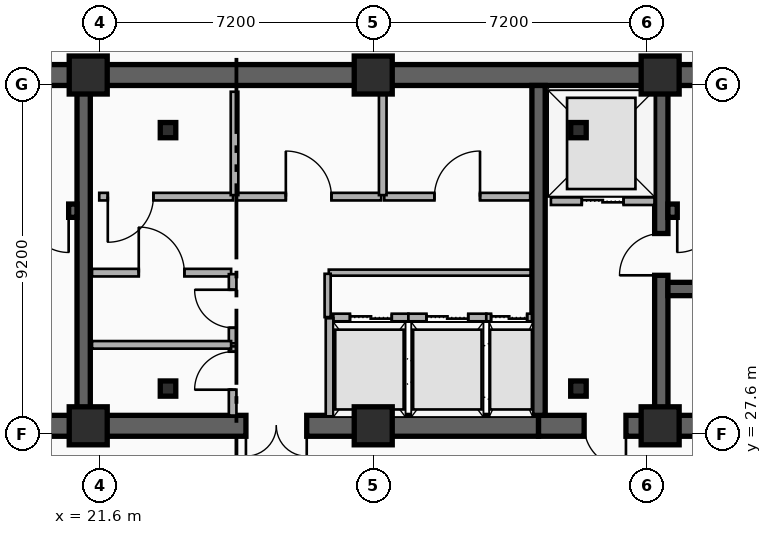
"""IFC4 building model, lengths in metres.
Left out: names, types, materials, properties, quantities, classifications, styles, units other than length and angle.
Written with IfcOpenShell. Run it as: python <this file> out.ifc"""

import sys

from ifc_helpers import new_model, si_unit, direction, frame, frame_2d, origin, origin_2d, place, context, subcontext, project, spatial, rectangle, i_section, extrude, element, fill, save


model = new_model("IFC4")
c1 = context("Model", 3, precision=1e-05, world=origin(), true_north=direction((0.0, 1.0)))
c2 = subcontext(c1, "Body", "Model", "MODEL_VIEW")
j1 = project(units=[si_unit("LENGTHUNIT", "METRE"), si_unit("PLANEANGLEUNIT", "RADIAN")], contexts=[c1])
p1 = place(None, origin())
s1 = spatial("IfcSite", under=j1, at=p1, CompositionType="ELEMENT")
p2 = place(p1, origin())
s2 = spatial("IfcBuilding", under=s1, at=p2, CompositionType="ELEMENT")
p3 = place(p2, frame((0.0, 0.0, 200.4)))
s3 = spatial("IfcBuildingStorey", under=s2, at=p3, CompositionType="ELEMENT", Elevation=200.4)
p4 = place(p3, frame((12.15, 37.05, 0.0), z_axis=(0.0, 0.0, 1.0), x_axis=(1.0, 0.0, 0.0)))
e1 = element("IfcWall", 1, at=p4, inside=s3, PredefinedType="SHEAR", context=c2, shape_type="SweptSolid", body=[
    extrude(rectangle(XDim=33.23, YDim=0.55, at=frame_2d((16.615, 0.0))), origin(), (0.0, 0.0, 1.0), 3.6),
])
p5 = place(p3, frame((21.18, 27.82, 0.0), z_axis=(0.0, 0.0, 1.0), x_axis=(-1.0, 0.0, 0.0)))
e2 = element("IfcWall", 2, at=p5, inside=s3, PredefinedType="SHEAR", context=c2, shape_type="SweptSolid", body=[
    extrude(rectangle(XDim=9.03, YDim=0.55, at=frame_2d((4.515, 0.0))), origin(), (0.0, 0.0, 1.0), 3.6),
])
p6 = place(p5, frame((2.68, 0.0, 0.0)))
e3 = element("IfcOpeningElement", 3, at=p6, cuts=e2, PredefinedType="OPENING", context=c2, shape_type="SweptSolid", body=[
    extrude(rectangle(XDim=1.1, YDim=2.15, at=frame_2d((0.55, 1.075))), frame((0.0, 0.285, 0.0), z_axis=(0.0, -1.0, 0.0), x_axis=(1.0, 0.0, 0.0)), (0.0, 0.0, 1.0), 0.57),
])
p7 = place(p3, frame((33.15, 27.82, 0.0), z_axis=(0.0, 0.0, 1.0), x_axis=(-1.0, 0.0, 0.0)))
e4 = element("IfcWall", 4, at=p7, inside=s3, PredefinedType="SHEAR", context=c2, shape_type="SweptSolid", body=[
    extrude(rectangle(XDim=11.97, YDim=0.55, at=frame_2d((5.985, 0.0))), origin(), (0.0, 0.0, 1.0), 3.6),
])
p8 = place(p7, frame((6.1, 0.0, 0.0)))
e5 = element("IfcOpeningElement", 5, at=p8, cuts=e4, PredefinedType="OPENING", context=c2, shape_type="SweptSolid", body=[
    extrude(rectangle(XDim=1.6, YDim=2.2, at=frame_2d((0.8, 1.1))), frame((0.0, 0.285, 0.0), z_axis=(0.0, -1.0, 0.0), x_axis=(1.0, 0.0, 0.0)), (0.0, 0.0, 1.0), 0.57),
])
p9 = place(p3, frame((45.38, 27.82, 0.0), z_axis=(0.0, 0.0, 1.0), x_axis=(-1.0, 0.0, 0.0)))
e6 = element("IfcWall", 6, at=p9, inside=s3, PredefinedType="SHEAR", context=c2, shape_type="SweptSolid", body=[
    extrude(rectangle(XDim=12.23, YDim=0.55, at=frame_2d((6.115, 0.0))), origin(), (0.0, 0.0, 1.0), 3.6),
])
p10 = place(p9, frame((9.93, 0.0, 0.0)))
e7 = element("IfcOpeningElement", 7, at=p10, cuts=e6, PredefinedType="OPENING", context=c2, shape_type="SweptSolid", body=[
    extrude(rectangle(XDim=1.1, YDim=2.15, at=frame_2d((0.55, 1.075))), frame((0.0, 0.285, 0.0), z_axis=(0.0, -1.0, 0.0), x_axis=(1.0, 0.0, 0.0)), (0.0, 0.0, 1.0), 0.57),
])
p11 = place(p9, frame((6.23, 0.0, 0.0)))
e8 = element("IfcOpeningElement", 8, at=p11, cuts=e6, PredefinedType="OPENING", context=c2, shape_type="SweptSolid", body=[
    extrude(rectangle(XDim=1.1, YDim=2.15, at=frame_2d((0.55, 1.075))), frame((0.0, 0.285, 0.0), z_axis=(0.0, -1.0, 0.0), x_axis=(1.0, 0.0, 0.0)), (0.0, 0.0, 1.0), 0.57),
])
for number, where, z_axis, x_axis in (
    (9, (21.18, 28.095, 0.0), (0.0, 0.0, 1.0), (0.0, 1.0, 0.0)),
    (10, (33.15, 28.095, 0.0), (0.0, 0.0, 1.0), (0.0, 1.0, 0.0)),
):
    element("IfcWall", number, at=place(p3, frame(where, z_axis=z_axis, x_axis=x_axis)), inside=s3, PredefinedType="SHEAR", context=c2, shape_type="SweptSolid", body=[
        extrude(rectangle(XDim=8.68, YDim=0.35, at=frame_2d((4.34, 0.0))), origin(), (0.0, 0.0, 1.0), 3.6),
    ])
p12 = place(p3, frame((36.38, 28.095, 0.0), z_axis=(0.0, 0.0, 1.0), x_axis=(0.0, 1.0, 0.0)))
e11 = element("IfcWall", 11, at=p12, inside=s3, PredefinedType="SHEAR", context=c2, shape_type="SweptSolid", body=[
    extrude(rectangle(XDim=8.68, YDim=0.35, at=frame_2d((4.34, 0.0))), origin(), (0.0, 0.0, 1.0), 3.6),
])
p13 = place(p12, frame((3.685, 0.0, 0.0)))
e12 = element("IfcOpeningElement", 12, at=p13, cuts=e11, PredefinedType="OPENING", context=c2, shape_type="SweptSolid", body=[
    extrude(rectangle(XDim=1.1, YDim=2.15, at=frame_2d((0.55, 1.075))), frame((0.0, 0.185, 0.0), z_axis=(0.0, -1.0, 0.0), x_axis=(1.0, 0.0, 0.0)), (0.0, 0.0, 1.0), 0.37),
])
p14 = place(p3, frame((21.005, 33.48, 0.0), z_axis=(0.0, 0.0, 1.0), x_axis=(-1.0, 0.0, 0.0)))
e13 = element("IfcWall", 13, at=p14, inside=s3, PredefinedType="SHEAR", context=c2, shape_type="SweptSolid", body=[
    extrude(rectangle(XDim=8.58, YDim=0.35, at=frame_2d((4.29, 0.0))), origin(), (0.0, 0.0, 1.0), 3.6),
])
p15 = place(p14, frame((0.22, 0.0, 0.0)))
e14 = element("IfcOpeningElement", 14, at=p15, cuts=e13, PredefinedType="OPENING", context=c2, shape_type="SweptSolid", body=[
    extrude(rectangle(XDim=1.1, YDim=2.15, at=frame_2d((0.55, 1.075))), frame((0.0, 0.185, 0.0), z_axis=(0.0, -1.0, 0.0), x_axis=(1.0, 0.0, 0.0)), (0.0, 0.0, 1.0), 0.37),
])
p16 = place(p3, frame((45.105, 33.48, 0.0), z_axis=(0.0, 0.0, 1.0), x_axis=(-1.0, 0.0, 0.0)))
e15 = element("IfcWall", 15, at=p16, inside=s3, PredefinedType="SHEAR", context=c2, shape_type="SweptSolid", body=[
    extrude(rectangle(XDim=8.55, YDim=0.35, at=frame_2d((4.275, 0.0))), origin(), (0.0, 0.0, 1.0), 3.6),
])
p17 = place(p16, frame((7.205, 0.0, 0.0)))
e16 = element("IfcOpeningElement", 16, at=p17, cuts=e15, PredefinedType="OPENING", context=c2, shape_type="SweptSolid", body=[
    extrude(rectangle(XDim=1.1, YDim=2.15, at=frame_2d((0.55, 1.075))), frame((0.0, 0.185, 0.0), z_axis=(0.0, -1.0, 0.0), x_axis=(1.0, 0.0, 0.0)), (0.0, 0.0, 1.0), 0.37),
])
p18 = place(p3, frame((36.555, 31.42, 0.0), z_axis=(0.0, 0.0, 1.0), x_axis=(1.0, 0.0, 0.0)))
e17 = element("IfcWall", 17, at=p18, inside=s3, PredefinedType="SHEAR", context=c2, shape_type="SweptSolid", body=[
    extrude(rectangle(XDim=8.55, YDim=0.35, at=frame_2d((4.275, 0.0))), origin(), (0.0, 0.0, 1.0), 3.6),
])
for number, where, z_axis, x_axis in (
    (18, (23.4, 28.8, 0.0), (0.0, 0.0, 1.0), (1.0, 0.0, 0.0)),
    (19, (34.2, 28.8, 0.0), (0.0, 0.0, 1.0), (1.0, 0.0, 0.0)),
    (20, (34.2, 35.6, 0.0), (0.0, 0.0, 1.0), (1.0, 0.0, 0.0)),
    (21, (23.4, 35.6, 0.0), (0.0, 0.0, 1.0), (1.0, 0.0, 0.0)),
):
    element("IfcColumn", number, at=place(p3, frame(where, z_axis=z_axis, x_axis=x_axis)), inside=s3, PredefinedType="COLUMN", context=c2, shape_type="SweptSolid", body=[
        extrude(i_section(OverallWidth=0.408, OverallDepth=0.4, WebThickness=0.025, FlangeThickness=0.039, FilletRadius=0.015, at=origin_2d()), origin(), (0.0, 0.0, 1.0), 3.6),
    ])
for number, where, z_axis, x_axis in (
    (22, (21.3, 27.82, 0.0), (0.0, 0.0, 1.0), (1.0, 0.0, 0.0)),
    (23, (21.3, 37.05, 0.0), (0.0, 0.0, 1.0), (1.0, 0.0, 0.0)),
    (24, (28.8, 27.82, 0.0), (0.0, 0.0, 1.0), (1.0, 0.0, 0.0)),
    (25, (28.8, 37.05, 0.0), (0.0, 0.0, 1.0), (1.0, 0.0, 0.0)),
    (26, (36.35, 27.82, 0.0), (0.0, 0.0, 1.0), (1.0, 0.0, 0.0)),
    (27, (36.35, 37.05, 0.0), (0.0, 0.0, 1.0), (1.0, 0.0, 0.0)),
):
    element("IfcColumn", number, at=place(p3, frame(where, z_axis=z_axis, x_axis=x_axis)), inside=s3, PredefinedType="COLUMN", context=c2, shape_type="SweptSolid", body=[
        extrude(rectangle(XDim=1.0, YDim=1.0, at=origin_2d()), origin(), (0.0, 0.0, 1.0), 3.6),
    ])
p19 = place(p3, frame((33.475, 33.73, 0.0), z_axis=(0.0, 0.0, 1.0), x_axis=(1.0, 0.0, 0.0)))
e28 = element("IfcWall", 28, at=p19, inside=s3, PredefinedType="PARTITIONING", context=c2, shape_type="SweptSolid", body=[
    extrude(rectangle(XDim=2.725, YDim=0.2, at=frame_2d((1.362, 0.0))), origin(), (0.0, 0.0, 1.0), 2.41),
])
p20 = place(p19, frame((0.812, 0.0, 0.0)))
e29 = element("IfcOpeningElement", 29, at=p20, cuts=e28, PredefinedType="OPENING", context=c2, shape_type="SweptSolid", body=[
    extrude(rectangle(XDim=1.1, YDim=2.15, at=frame_2d((0.55, 1.075))), frame((0.0, 0.11, 0.0), z_axis=(0.0, -1.0, 0.0), x_axis=(1.0, 0.0, 0.0)), (0.0, 0.0, 1.0), 0.22),
])
p21 = place(p3, frame((27.75, 30.67, 0.0), z_axis=(0.0, 0.0, 1.0), x_axis=(1.0, 0.0, 0.0)))
e30 = element("IfcWall", 30, at=p21, inside=s3, PredefinedType="PARTITIONING", context=c2, shape_type="SweptSolid", body=[
    extrude(rectangle(XDim=1.975, YDim=0.2, at=frame_2d((0.988, 0.0))), origin(), (0.0, 0.0, 1.0), 2.41),
])
p22 = place(p21, frame((0.438, 0.0, 0.0)))
e31 = element("IfcOpeningElement", 31, at=p22, cuts=e30, PredefinedType="OPENING", context=c2, shape_type="SweptSolid", body=[
    extrude(rectangle(XDim=1.1, YDim=2.15, at=frame_2d((0.55, 1.075))), frame((0.0, 0.11, 0.0), z_axis=(0.0, -1.0, 0.0), x_axis=(1.0, 0.0, 0.0)), (0.0, 0.0, 1.0), 0.22),
])
p23 = place(p3, frame((27.65, 28.07, 0.0), z_axis=(0.0, 0.0, 1.0), x_axis=(0.0, 1.0, 0.0)))
e32 = element("IfcWall", 32, at=p23, inside=s3, PredefinedType="PARTITIONING", context=c2, shape_type="SweptSolid", body=[
    extrude(rectangle(XDim=2.58, YDim=0.2, at=frame_2d((1.29, 0.0))), origin(), (0.0, 0.0, 1.0), 2.41),
])
p24 = place(p3, frame((29.725, 30.67, 0.0), z_axis=(0.0, 0.0, 1.0), x_axis=(1.0, 0.0, 0.0)))
e33 = element("IfcWall", 33, at=p24, inside=s3, PredefinedType="PARTITIONING", context=c2, shape_type="SweptSolid", body=[
    extrude(rectangle(XDim=2.05, YDim=0.2, at=frame_2d((1.025, 0.0))), origin(), (0.0, 0.0, 1.0), 2.72),
])
p25 = place(p24, frame((0.475, 0.0, 0.0)))
e34 = element("IfcOpeningElement", 34, at=p25, cuts=e33, PredefinedType="OPENING", context=c2, shape_type="SweptSolid", body=[
    extrude(rectangle(XDim=1.1, YDim=2.15, at=frame_2d((0.55, 1.075))), frame((0.0, 0.11, 0.0), z_axis=(0.0, -1.0, 0.0), x_axis=(1.0, 0.0, 0.0)), (0.0, 0.0, 1.0), 0.22),
])
p26 = place(p3, frame((31.775, 30.67, 0.0), z_axis=(0.0, 0.0, 1.0), x_axis=(1.0, 0.0, 0.0)))
e35 = element("IfcWall", 35, at=p26, inside=s3, PredefinedType="PARTITIONING", context=c2, shape_type="SweptSolid", body=[
    extrude(rectangle(XDim=1.2, YDim=0.2, at=frame_2d((0.6, 0.0))), origin(), (0.0, 0.0, 1.0), 2.72),
])
p27 = place(p26, frame((0.125, 0.0, 0.0)))
e36 = element("IfcOpeningElement", 36, at=p27, cuts=e35, PredefinedType="OPENING", context=c2, shape_type="SweptSolid", body=[
    extrude(rectangle(XDim=0.95, YDim=2.15, at=frame_2d((0.475, 1.075))), frame((0.0, 0.11, 0.0), z_axis=(0.0, -1.0, 0.0), x_axis=(1.0, 0.0, 0.0)), (0.0, 0.0, 1.0), 0.22),
])
p28 = place(p3, frame((21.4, 31.85, 0.0), z_axis=(0.0, 0.0, 1.0), x_axis=(1.0, 0.0, 0.0)))
e37 = element("IfcWall", 37, at=p28, inside=s3, PredefinedType="PARTITIONING", context=c2, shape_type="SweptSolid", body=[
    extrude(rectangle(XDim=3.66, YDim=0.2, at=frame_2d((1.83, 0.0))), origin(), (0.0, 0.0, 1.0), 2.41),
])
p29 = place(p28, frame((1.23, 0.0, 0.0)))
e38 = element("IfcOpeningElement", 38, at=p29, cuts=e37, PredefinedType="OPENING", context=c2, shape_type="SweptSolid", body=[
    extrude(rectangle(XDim=1.2, YDim=2.15, at=frame_2d((0.6, 1.075))), frame((0.0, 0.11, 0.0), z_axis=(0.0, -1.0, 0.0), x_axis=(1.0, 0.0, 0.0)), (0.0, 0.0, 1.0), 0.22),
])
p30 = place(p3, frame((25.11, 33.85, 0.0), z_axis=(0.0, 0.0, 1.0), x_axis=(-1.0, 0.0, 0.0)))
e39 = element("IfcWall", 39, at=p30, inside=s3, PredefinedType="PARTITIONING", context=c2, shape_type="SweptSolid", body=[
    extrude(rectangle(XDim=3.52, YDim=0.2, at=frame_2d((1.76, 0.0))), origin(), (0.0, 0.0, 1.0), 2.41),
])
p31 = place(p30, frame((2.095, 0.0, 0.0)))
e40 = element("IfcOpeningElement", 40, at=p31, cuts=e39, PredefinedType="OPENING", context=c2, shape_type="SweptSolid", body=[
    extrude(rectangle(XDim=1.2, YDim=2.15, at=frame_2d((0.6, 1.075))), frame((0.0, 0.11, 0.0), z_axis=(0.0, -1.0, 0.0), x_axis=(1.0, 0.0, 0.0)), (0.0, 0.0, 1.0), 0.22),
])
p32 = place(p3, frame((25.19, 33.85, 0.0), z_axis=(0.0, 0.0, 1.0), x_axis=(1.0, 0.0, 0.0)))
e41 = element("IfcWall", 41, at=p32, inside=s3, PredefinedType="PARTITIONING", context=c2, shape_type="SweptSolid", body=[
    extrude(rectangle(XDim=3.82, YDim=0.2, at=frame_2d((1.91, 0.0))), origin(), (0.0, 0.0, 1.0), 2.41),
])
p33 = place(p32, frame((1.31, 0.0, 0.0)))
e42 = element("IfcOpeningElement", 42, at=p33, cuts=e41, PredefinedType="OPENING", context=c2, shape_type="SweptSolid", body=[
    extrude(rectangle(XDim=1.2, YDim=2.15, at=frame_2d((0.6, 1.075))), frame((0.0, 0.11, 0.0), z_axis=(0.0, -1.0, 0.0), x_axis=(1.0, 0.0, 0.0)), (0.0, 0.0, 1.0), 0.22),
])
p34 = place(p3, frame((29.09, 33.85, 0.0), z_axis=(0.0, 0.0, 1.0), x_axis=(1.0, 0.0, 0.0)))
e43 = element("IfcWall", 43, at=p34, inside=s3, PredefinedType="PARTITIONING", context=c2, shape_type="SweptSolid", body=[
    extrude(rectangle(XDim=3.84, YDim=0.2, at=frame_2d((1.92, 0.0))), origin(), (0.0, 0.0, 1.0), 2.41),
])
p35 = place(p34, frame((1.32, 0.0, 0.0)))
e44 = element("IfcOpeningElement", 44, at=p35, cuts=e43, PredefinedType="OPENING", context=c2, shape_type="SweptSolid", body=[
    extrude(rectangle(XDim=1.2, YDim=2.15, at=frame_2d((0.6, 1.075))), frame((0.0, 0.11, 0.0), z_axis=(0.0, -1.0, 0.0), x_axis=(1.0, 0.0, 0.0)), (0.0, 0.0, 1.0), 0.22),
])
p36 = place(p3, frame((25.1, 28.09, 0.0), z_axis=(0.0, 0.0, 1.0), x_axis=(0.0, 1.0, 0.0)))
e45 = element("IfcWall", 45, at=p36, inside=s3, PredefinedType="PARTITIONING", context=c2, shape_type="SweptSolid", body=[
    extrude(rectangle(XDim=1.82, YDim=0.2, at=frame_2d((0.91, 0.0))), origin(), (0.0, 0.0, 1.0), 2.72),
])
p37 = place(p36, frame((0.68, 0.0, 0.0)))
e46 = element("IfcOpeningElement", 46, at=p37, cuts=e45, PredefinedType="OPENING", context=c2, shape_type="SweptSolid", body=[
    extrude(rectangle(XDim=1.0, YDim=2.15, at=frame_2d((0.5, 1.075))), frame((0.0, 0.11, 0.0), z_axis=(0.0, -1.0, 0.0), x_axis=(1.0, 0.0, 0.0)), (0.0, 0.0, 1.0), 0.22),
])
p38 = place(p3, frame((25.1, 29.99, 0.0), z_axis=(0.0, 0.0, 1.0), x_axis=(0.0, 1.0, 0.0)))
e47 = element("IfcWall", 47, at=p38, inside=s3, PredefinedType="PARTITIONING", context=c2, shape_type="SweptSolid", body=[
    extrude(rectangle(XDim=1.82, YDim=0.2, at=frame_2d((0.91, 0.0))), origin(), (0.0, 0.0, 1.0), 3.34),
])
p39 = place(p38, frame((0.41, 0.0, 0.0)))
e48 = element("IfcOpeningElement", 48, at=p39, cuts=e47, PredefinedType="OPENING", context=c2, shape_type="SweptSolid", body=[
    extrude(rectangle(XDim=1.0, YDim=2.15, at=frame_2d((0.5, 1.075))), frame((0.0, 0.11, 0.0), z_axis=(0.0, -1.0, 0.0), x_axis=(1.0, 0.0, 0.0)), (0.0, 0.0, 1.0), 0.22),
])
p40 = place(p3, frame((21.4, 29.95, 0.0), z_axis=(0.0, 0.0, 1.0), x_axis=(1.0, 0.0, 0.0)))
e49 = element("IfcWall", 49, at=p40, inside=s3, PredefinedType="PARTITIONING", context=c2, shape_type="SweptSolid", body=[
    extrude(rectangle(XDim=3.66, YDim=0.2, at=frame_2d((1.83, 0.0))), origin(), (0.0, 0.0, 1.0), 2.41),
])
p41 = place(p3, frame((25.15, 33.89, 0.0), z_axis=(0.0, 0.0, 1.0), x_axis=(0.0, 1.0, 0.0)))
e50 = element("IfcWall", 50, at=p41, inside=s3, PredefinedType="PARTITIONING", context=c2, shape_type="SweptSolid", body=[
    extrude(rectangle(XDim=2.72, YDim=0.2, at=frame_2d((1.36, 0.0))), origin(), (0.0, 0.0, 1.0), 3.34),
])
p42 = place(p3, frame((29.05, 33.89, 0.0), z_axis=(0.0, 0.0, 1.0), x_axis=(0.0, 1.0, 0.0)))
e51 = element("IfcWall", 51, at=p42, inside=s3, PredefinedType="PARTITIONING", context=c2, shape_type="SweptSolid", body=[
    extrude(rectangle(XDim=2.72, YDim=0.2, at=frame_2d((1.36, 0.0))), origin(), (0.0, 0.0, 1.0), 2.41),
])
p43 = place(p3, frame((27.63, 31.85, 0.0), z_axis=(0.0, 0.0, 1.0), x_axis=(1.0, 0.0, 0.0)))
e52 = element("IfcWall", 52, at=p43, inside=s3, PredefinedType="PARTITIONING", context=c2, shape_type="SweptSolid", body=[
    extrude(rectangle(XDim=5.31, YDim=0.16, at=frame_2d((2.655, 0.0))), origin(), (0.0, 0.0, 1.0), 2.41),
])
p44 = place(p3, frame((27.6, 30.68, 0.0), z_axis=(0.0, 0.0, 1.0), x_axis=(0.0, 1.0, 0.0)))
e53 = element("IfcWall", 53, at=p44, inside=s3, PredefinedType="PARTITIONING", context=c2, shape_type="SweptSolid", body=[
    extrude(rectangle(XDim=1.14, YDim=0.16, at=frame_2d((0.57, 0.0))), origin(), (0.0, 0.0, 1.0), 3.34),
])
p45 = place(p20, origin())
e54 = element("IfcDoor", 54, at=p45, inside=s3, OperationType="DOUBLE_DOOR_SLIDING", PredefinedType="DOOR", context=c2, shape_type="SweptSolid", body=[
    extrude(rectangle(XDim=1.1, YDim=2.15, at=frame_2d((0.55, 1.075))), frame((0.0, 0.025, 0.0), z_axis=(0.0, -1.0, 0.0), x_axis=(1.0, 0.0, 0.0)), (0.0, 0.0, 1.0), 0.05),
])
fill(e29, e54)
p46 = place(p22, origin())
e55 = element("IfcDoor", 55, at=p46, inside=s3, OperationType="DOUBLE_DOOR_SLIDING", PredefinedType="DOOR", context=c2, shape_type="SweptSolid", body=[
    extrude(rectangle(XDim=1.1, YDim=2.15, at=frame_2d((0.55, 1.075))), frame((0.0, 0.025, 0.0), z_axis=(0.0, -1.0, 0.0), x_axis=(1.0, 0.0, 0.0)), (0.0, 0.0, 1.0), 0.05),
])
fill(e31, e55)
p47 = place(p25, origin())
e56 = element("IfcDoor", 56, at=p47, inside=s3, OperationType="DOUBLE_DOOR_SLIDING", PredefinedType="DOOR", context=c2, shape_type="SweptSolid", body=[
    extrude(rectangle(XDim=1.1, YDim=2.15, at=frame_2d((0.55, 1.075))), frame((0.0, 0.025, 0.0), z_axis=(0.0, -1.0, 0.0), x_axis=(1.0, 0.0, 0.0)), (0.0, 0.0, 1.0), 0.05),
])
fill(e34, e56)
p48 = place(p27, origin())
e57 = element("IfcDoor", 57, at=p48, inside=s3, OperationType="DOUBLE_DOOR_SLIDING", PredefinedType="DOOR", context=c2, shape_type="SweptSolid", body=[
    extrude(rectangle(XDim=0.95, YDim=2.15, at=frame_2d((0.475, 1.075))), frame((0.0, 0.025, 0.0), z_axis=(0.0, -1.0, 0.0), x_axis=(1.0, 0.0, 0.0)), (0.0, 0.0, 1.0), 0.05),
])
fill(e36, e57)
p49 = place(p15, origin())
e58 = element("IfcDoor", 58, at=p49, inside=s3, OperationType="SINGLE_SWING_LEFT", PredefinedType="DOOR", context=c2, shape_type="SweptSolid", body=[
    extrude(rectangle(XDim=1.1, YDim=2.15, at=frame_2d((0.55, 1.075))), frame((0.0, 0.025, 0.0), z_axis=(0.0, -1.0, 0.0), x_axis=(1.0, 0.0, 0.0)), (0.0, 0.0, 1.0), 0.05),
])
fill(e14, e58)
p50 = place(p17, origin())
e59 = element("IfcDoor", 59, at=p50, inside=s3, OperationType="SINGLE_SWING_RIGHT", PredefinedType="DOOR", context=c2, shape_type="SweptSolid", body=[
    extrude(rectangle(XDim=1.1, YDim=2.15, at=frame_2d((0.55, 1.075))), frame((0.0, 0.025, 0.0), z_axis=(0.0, -1.0, 0.0), x_axis=(1.0, 0.0, 0.0)), (0.0, 0.0, 1.0), 0.05),
])
fill(e16, e59)
p51 = place(p13, origin())
e60 = element("IfcDoor", 60, at=p51, inside=s3, OperationType="SINGLE_SWING_LEFT", PredefinedType="DOOR", context=c2, shape_type="SweptSolid", body=[
    extrude(rectangle(XDim=1.1, YDim=2.15, at=frame_2d((0.55, 1.075))), frame((0.0, 0.025, 0.0), z_axis=(0.0, -1.0, 0.0), x_axis=(1.0, 0.0, 0.0)), (0.0, 0.0, 1.0), 0.05),
])
fill(e12, e60)
p52 = place(p10, origin())
e61 = element("IfcDoor", 61, at=p52, inside=s3, OperationType="SINGLE_SWING_LEFT", PredefinedType="DOOR", context=c2, shape_type="SweptSolid", body=[
    extrude(rectangle(XDim=1.1, YDim=2.15, at=frame_2d((0.55, 1.075))), frame((0.0, 0.025, 0.0), z_axis=(0.0, -1.0, 0.0), x_axis=(1.0, 0.0, 0.0)), (0.0, 0.0, 1.0), 0.05),
])
fill(e7, e61)
p53 = place(p8, origin())
e62 = element("IfcDoor", 62, at=p53, inside=s3, OperationType="SINGLE_SWING_LEFT", PredefinedType="DOOR", context=c2, shape_type="SweptSolid", body=[
    extrude(rectangle(XDim=1.6, YDim=2.2, at=frame_2d((0.8, 1.1))), frame((0.0, 0.025, 0.0), z_axis=(0.0, -1.0, 0.0), x_axis=(1.0, 0.0, 0.0)), (0.0, 0.0, 1.0), 0.05),
])
fill(e5, e62)
p54 = place(p29, origin())
e63 = element("IfcDoor", 63, at=p54, inside=s3, OperationType="SINGLE_SWING_LEFT", PredefinedType="DOOR", context=c2, shape_type="SweptSolid", body=[
    extrude(rectangle(XDim=1.2, YDim=2.15, at=frame_2d((0.6, 1.075))), frame((0.0, 0.025, 0.0), z_axis=(0.0, -1.0, 0.0), x_axis=(1.0, 0.0, 0.0)), (0.0, 0.0, 1.0), 0.05),
])
fill(e38, e63)
p55 = place(p31, origin())
e64 = element("IfcDoor", 64, at=p55, inside=s3, OperationType="SINGLE_SWING_RIGHT", PredefinedType="DOOR", context=c2, shape_type="SweptSolid", body=[
    extrude(rectangle(XDim=1.2, YDim=2.15, at=frame_2d((0.6, 1.075))), frame((0.0, 0.025, 0.0), z_axis=(0.0, -1.0, 0.0), x_axis=(1.0, 0.0, 0.0)), (0.0, 0.0, 1.0), 0.05),
])
fill(e40, e64)
p56 = place(p33, origin())
e65 = element("IfcDoor", 65, at=p56, inside=s3, OperationType="SINGLE_SWING_LEFT", PredefinedType="DOOR", context=c2, shape_type="SweptSolid", body=[
    extrude(rectangle(XDim=1.2, YDim=2.15, at=frame_2d((0.6, 1.075))), frame((0.0, 0.025, 0.0), z_axis=(0.0, -1.0, 0.0), x_axis=(1.0, 0.0, 0.0)), (0.0, 0.0, 1.0), 0.05),
])
fill(e42, e65)
p57 = place(p35, origin())
e66 = element("IfcDoor", 66, at=p57, inside=s3, OperationType="SINGLE_SWING_RIGHT", PredefinedType="DOOR", context=c2, shape_type="SweptSolid", body=[
    extrude(rectangle(XDim=1.2, YDim=2.15, at=frame_2d((0.6, 1.075))), frame((0.0, 0.025, 0.0), z_axis=(0.0, -1.0, 0.0), x_axis=(1.0, 0.0, 0.0)), (0.0, 0.0, 1.0), 0.05),
])
fill(e44, e66)
p58 = place(p37, origin())
e67 = element("IfcDoor", 67, at=p58, inside=s3, OperationType="SINGLE_SWING_LEFT", PredefinedType="DOOR", context=c2, shape_type="SweptSolid", body=[
    extrude(rectangle(XDim=1.0, YDim=2.15, at=frame_2d((0.5, 1.075))), frame((0.0, 0.025, 0.0), z_axis=(0.0, -1.0, 0.0), x_axis=(1.0, 0.0, 0.0)), (0.0, 0.0, 1.0), 0.05),
])
fill(e46, e67)
p59 = place(p39, origin())
e68 = element("IfcDoor", 68, at=p59, inside=s3, OperationType="SINGLE_SWING_RIGHT", PredefinedType="DOOR", context=c2, shape_type="SweptSolid", body=[
    extrude(rectangle(XDim=1.0, YDim=2.15, at=frame_2d((0.5, 1.075))), frame((0.0, 0.025, 0.0), z_axis=(0.0, -1.0, 0.0), x_axis=(1.0, 0.0, 0.0)), (0.0, 0.0, 1.0), 0.05),
])
fill(e48, e68)
save(model, sys.argv[1])
